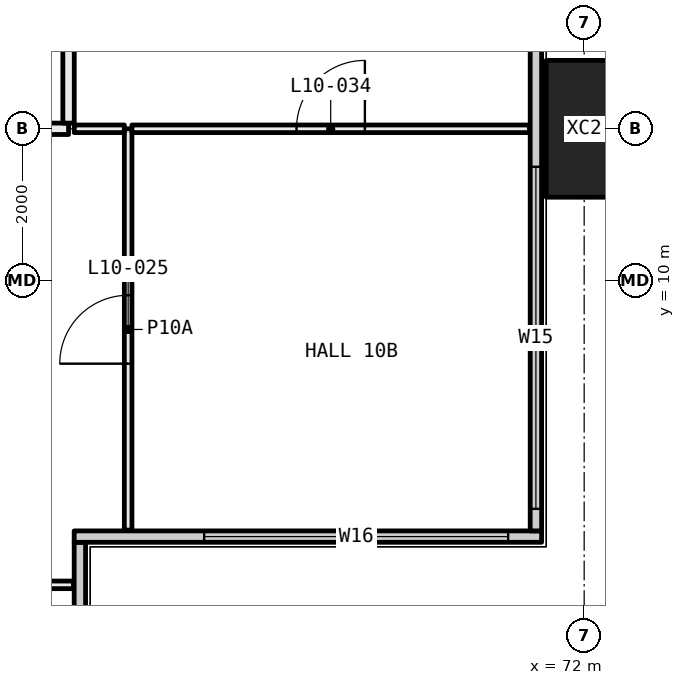
"""IFC4 building model, lengths in metres.
Left out: names, types, materials, properties, quantities, classifications, styles, units other than length and angle.
Written with IfcOpenShell. Run it as: python <this file> out.ifc"""

import sys

from ifc_helpers import new_model, si_unit, direction, frame, frame_2d, origin, origin_2d, place, context, subcontext, project, spatial, rectangle, hollow_rectangle, extrude, element, fill, save


model = new_model("IFC4")
c1 = context("Model", 3, precision=1e-05, world=origin(), true_north=direction((0.0, 1.0)))
c2 = subcontext(c1, "Body", "Model", "MODEL_VIEW")
j1 = project(units=[si_unit("LENGTHUNIT", "METRE"), si_unit("PLANEANGLEUNIT", "RADIAN")], contexts=[c1])
p1 = place(None, origin())
s1 = spatial("IfcSite", under=j1, at=p1, CompositionType="ELEMENT")
p2 = place(p1, origin())
s2 = spatial("IfcBuilding", under=s1, at=p2, CompositionType="ELEMENT")
p3 = place(p2, frame((0.0, 0.0, 47.25)))
s3 = spatial("IfcBuildingStorey", under=s2, at=p3, CompositionType="ELEMENT", Elevation=47.25)
p4 = place(p3, frame((72.0, 12.0, -0.4), z_axis=(0.0, 0.0, 1.0), x_axis=(0.0, 1.0, 0.0)))
e1 = element("IfcColumn", 1, at=p4, inside=s3, PredefinedType="COLUMN", context=c2, shape_type="SweptSolid", body=[
    extrude(hollow_rectangle(XDim=1.8, YDim=1.0, WallThickness=0.07, at=origin_2d()), origin(), (0.0, 0.0, 1.0), 3.45),
])
p5 = place(p3, frame((65.365, 0.71, 0.0), z_axis=(0.0, 0.0, 1.0), x_axis=(0.0, 1.0, 0.0)))
e2 = element("IfcWall", 2, at=p5, inside=s3, PredefinedType="ELEMENTEDWALL", context=c2, shape_type="SweptSolid", body=[
    extrude(rectangle(XDim=5.85, YDim=0.15, at=frame_2d((2.925, 0.0))), origin(), (0.0, 0.0, 1.0), 3.05),
])
p6 = place(p5, frame((0.29, 0.0, 0.45)))
e3 = element("IfcOpeningElement", 3, at=p6, cuts=e2, PredefinedType="OPENING", context=c2, shape_type="SweptSolid", body=[
    extrude(rectangle(XDim=4.0, YDim=2.55, at=frame_2d((2.0, 1.275))), frame((0.0, 0.085, 0.0), z_axis=(0.0, -1.0, 0.0), x_axis=(1.0, 0.0, 0.0)), (0.0, 0.0, 1.0), 0.17),
])
p7 = place(p3, frame((65.29, 6.635, 0.0), z_axis=(0.0, 0.0, 1.0), x_axis=(1.0, 0.0, 0.0)))
e4 = element("IfcWall", 4, at=p7, inside=s3, PredefinedType="ELEMENTEDWALL", context=c2, shape_type="SweptSolid", body=[
    extrude(rectangle(XDim=6.15, YDim=0.15, at=frame_2d((3.075, 0.0))), origin(), (0.0, 0.0, 1.0), 3.05),
])
p8 = place(p7, frame((1.71, 0.0, 0.45)))
e5 = element("IfcOpeningElement", 5, at=p8, cuts=e4, PredefinedType="OPENING", context=c2, shape_type="SweptSolid", body=[
    extrude(rectangle(XDim=4.0, YDim=2.55, at=frame_2d((2.0, 1.275))), frame((0.0, 0.085, 0.0), z_axis=(0.0, -1.0, 0.0), x_axis=(1.0, 0.0, 0.0)), (0.0, 0.0, 1.0), 0.17),
])
p9 = place(p3, frame((71.365, 6.71, 0.0), z_axis=(0.0, 0.0, 1.0), x_axis=(0.0, 1.0, 0.0)))
e6 = element("IfcWall", 6, at=p9, inside=s3, PredefinedType="ELEMENTEDWALL", context=c2, shape_type="SweptSolid", body=[
    extrude(rectangle(XDim=34.58, YDim=0.15, at=frame_2d((17.29, 0.0))), origin(), (0.0, 0.0, 1.0), 3.05),
])
p10 = place(p9, frame((0.29, 0.0, 0.45)))
e7 = element("IfcOpeningElement", 7, at=p10, cuts=e6, PredefinedType="OPENING", context=c2, shape_type="SweptSolid", body=[
    extrude(rectangle(XDim=4.5, YDim=2.55, at=frame_2d((2.25, 1.275))), frame((0.0, 0.085, 0.0), z_axis=(0.0, -1.0, 0.0), x_axis=(1.0, 0.0, 0.0)), (0.0, 0.0, 1.0), 0.17),
])
p11 = place(p9, frame((7.79, 0.0, 0.45)))
e8 = element("IfcOpeningElement", 8, at=p11, cuts=e6, PredefinedType="OPENING", context=c2, shape_type="SweptSolid", body=[
    extrude(rectangle(XDim=3.0, YDim=2.55, at=frame_2d((1.5, 1.275))), frame((0.0, 0.085, 0.0), z_axis=(0.0, -1.0, 0.0), x_axis=(1.0, 0.0, 0.0)), (0.0, 0.0, 1.0), 0.17),
])
p12 = place(p9, frame((11.79, 0.0, 0.45)))
e9 = element("IfcOpeningElement", 9, at=p12, cuts=e6, PredefinedType="OPENING", context=c2, shape_type="SweptSolid", body=[
    extrude(rectangle(XDim=3.0, YDim=2.55, at=frame_2d((1.5, 1.275))), frame((0.0, 0.085, 0.0), z_axis=(0.0, -1.0, 0.0), x_axis=(1.0, 0.0, 0.0)), (0.0, 0.0, 1.0), 0.17),
])
p13 = place(p9, frame((19.79, 0.0, 0.45)))
e10 = element("IfcOpeningElement", 10, at=p13, cuts=e6, PredefinedType="OPENING", context=c2, shape_type="SweptSolid", body=[
    extrude(rectangle(XDim=3.0, YDim=2.55, at=frame_2d((1.5, 1.275))), frame((0.0, 0.085, 0.0), z_axis=(0.0, -1.0, 0.0), x_axis=(1.0, 0.0, 0.0)), (0.0, 0.0, 1.0), 0.17),
])
p14 = place(p9, frame((23.79, 0.0, 0.45)))
e11 = element("IfcOpeningElement", 11, at=p14, cuts=e6, PredefinedType="OPENING", context=c2, shape_type="SweptSolid", body=[
    extrude(rectangle(XDim=2.0, YDim=2.55, at=frame_2d((1.0, 1.275))), frame((0.0, 0.085, 0.0), z_axis=(0.0, -1.0, 0.0), x_axis=(1.0, 0.0, 0.0)), (0.0, 0.0, 1.0), 0.17),
])
p15 = place(p9, frame((29.79, 0.0, 0.45)))
e12 = element("IfcOpeningElement", 12, at=p15, cuts=e6, PredefinedType="OPENING", context=c2, shape_type="SweptSolid", body=[
    extrude(rectangle(XDim=4.5, YDim=2.55, at=frame_2d((2.25, 1.275))), frame((0.0, 0.085, 0.0), z_axis=(0.0, -1.0, 0.0), x_axis=(1.0, 0.0, 0.0)), (0.0, 0.0, 1.0), 0.17),
])
p16 = place(p3, frame((65.28, 6.0, 0.0), z_axis=(0.0, 0.0, 1.0), x_axis=(-1.0, 0.0, 0.0)))
e13 = element("IfcWall", 13, at=p16, inside=s3, PredefinedType="PARTITIONING", context=c2, shape_type="SweptSolid", body=[
    extrude(rectangle(XDim=5.23, YDim=0.1, at=frame_2d((2.615, 0.0))), origin(), (0.0, 0.0, 1.0), 2.45),
])
p17 = place(p16, frame((2.165, 0.0, 0.0)))
e14 = element("IfcOpeningElement", 14, at=p17, cuts=e13, PredefinedType="OPENING", context=c2, shape_type="SweptSolid", body=[
    extrude(rectangle(XDim=0.9, YDim=2.1, at=frame_2d((0.45, 1.05))), frame((0.0, 0.06, 0.0), z_axis=(0.0, -1.0, 0.0), x_axis=(1.0, 0.0, 0.0)), (0.0, 0.0, 1.0), 0.12),
])
p18 = place(p3, frame((66.0, 6.72, 0.0), z_axis=(0.0, 0.0, 1.0), x_axis=(0.0, 1.0, 0.0)))
e15 = element("IfcWall", 15, at=p18, inside=s3, PredefinedType="PARTITIONING", context=c2, shape_type="SweptSolid", body=[
    extrude(rectangle(XDim=5.28, YDim=0.1, at=frame_2d((2.64, 0.0))), origin(), (0.0, 0.0, 1.0), 2.45),
])
p19 = place(p18, frame((2.19, 0.0, 0.0)))
e16 = element("IfcOpeningElement", 16, at=p19, cuts=e15, PredefinedType="OPENING", context=c2, shape_type="SweptSolid", body=[
    extrude(rectangle(XDim=0.9, YDim=2.1, at=frame_2d((0.45, 1.05))), frame((0.0, 0.06, 0.0), z_axis=(0.0, -1.0, 0.0), x_axis=(1.0, 0.0, 0.0)), (0.0, 0.0, 1.0), 0.12),
])
p20 = place(p3, frame((65.95, 12.0, 0.0), z_axis=(0.0, 0.0, 1.0), x_axis=(-1.0, 0.0, 0.0)))
e17 = element("IfcWall", 17, at=p20, inside=s3, PredefinedType="PARTITIONING", context=c2, shape_type="SweptSolid", body=[
    extrude(rectangle(XDim=0.659, YDim=0.1, at=frame_2d((0.33, 0.0))), origin(), (0.0, 0.0, 1.0), 2.45),
])
p21 = place(p3, frame((65.216, 12.0, 0.0), z_axis=(0.0, 0.0, 1.0), x_axis=(-1.0, 0.0, 0.0)))
e18 = element("IfcWall", 18, at=p21, inside=s3, PredefinedType="PARTITIONING", context=c2, shape_type="SweptSolid", body=[
    extrude(rectangle(XDim=3.716, YDim=0.15, at=frame_2d((1.858, 0.0))), origin(), (0.0, 0.0, 1.0), 2.45),
])
p22 = place(p21, frame((1.408, 0.0, 0.0)))
e19 = element("IfcOpeningElement", 19, at=p22, cuts=e18, PredefinedType="OPENING", context=c2, shape_type="SweptSolid", body=[
    extrude(rectangle(XDim=0.9, YDim=2.1, at=frame_2d((0.45, 1.05))), frame((0.0, 0.085, 0.0), z_axis=(0.0, -1.0, 0.0), x_axis=(1.0, 0.0, 0.0)), (0.0, 0.0, 1.0), 0.17),
])
p23 = place(p3, frame((71.28, 12.0, 0.0), z_axis=(0.0, 0.0, 1.0), x_axis=(-1.0, 0.0, 0.0)))
e20 = element("IfcWall", 20, at=p23, inside=s3, PredefinedType="PARTITIONING", context=c2, shape_type="SweptSolid", body=[
    extrude(rectangle(XDim=5.23, YDim=0.1, at=frame_2d((2.615, 0.0))), origin(), (0.0, 0.0, 1.0), 2.45),
])
p24 = place(p23, frame((2.165, 0.0, 0.0)))
e21 = element("IfcOpeningElement", 21, at=p24, cuts=e20, PredefinedType="OPENING", context=c2, shape_type="SweptSolid", body=[
    extrude(rectangle(XDim=0.9, YDim=2.1, at=frame_2d((0.45, 1.05))), frame((0.0, 0.06, 0.0), z_axis=(0.0, -1.0, 0.0), x_axis=(1.0, 0.0, 0.0)), (0.0, 0.0, 1.0), 0.12),
])
p25 = place(p3, frame((65.216, 15.229, 0.0), z_axis=(0.0, 0.0, 1.0), x_axis=(0.0, -1.0, 0.0)))
e22 = element("IfcWall", 22, at=p25, inside=s3, PredefinedType="PARTITIONING", context=c2, shape_type="SweptSolid", body=[
    extrude(rectangle(XDim=3.154, YDim=0.15, at=frame_2d((1.577, 0.0))), origin(), (0.0, 0.0, 1.0), 2.45),
])
p26 = place(p8, origin())
e23 = element("IfcWindow", 23, at=p26, inside=s3, PartitioningType="SINGLE_PANEL", PredefinedType="WINDOW", context=c2, shape_type="SweptSolid", body=[
    extrude(rectangle(XDim=4.0, YDim=2.55, at=frame_2d((2.0, 1.275))), frame((0.0, 0.03, 0.0), z_axis=(0.0, -1.0, 0.0), x_axis=(1.0, 0.0, 0.0)), (0.0, 0.0, 1.0), 0.06),
])
fill(e5, e23)
p27 = place(p10, origin())
e24 = element("IfcWindow", 24, at=p27, inside=s3, PartitioningType="SINGLE_PANEL", PredefinedType="WINDOW", context=c2, shape_type="SweptSolid", body=[
    extrude(rectangle(XDim=4.5, YDim=2.55, at=frame_2d((2.25, 1.275))), frame((0.0, 0.03, 0.0), z_axis=(0.0, -1.0, 0.0), x_axis=(1.0, 0.0, 0.0)), (0.0, 0.0, 1.0), 0.06),
])
fill(e7, e24)
p28 = place(p19, origin())
e25 = element("IfcDoor", 25, at=p28, inside=s3, OperationType="SINGLE_SWING_RIGHT", PredefinedType="DOOR", context=c2, shape_type="SweptSolid", body=[
    extrude(rectangle(XDim=0.9, YDim=2.1, at=frame_2d((0.45, 1.05))), frame((0.0, 0.025, 0.0), z_axis=(0.0, -1.0, 0.0), x_axis=(1.0, 0.0, 0.0)), (0.0, 0.0, 1.0), 0.05),
])
fill(e16, e25)
p29 = place(p24, frame((0.9, 0.0, 0.0), x_axis=(-1.0, 0.0, 0.0)))
e26 = element("IfcDoor", 26, at=p29, inside=s3, OperationType="SINGLE_SWING_LEFT", PredefinedType="DOOR", context=c2, shape_type="SweptSolid", body=[
    extrude(rectangle(XDim=0.9, YDim=2.1, at=frame_2d((0.45, 1.05))), frame((0.0, 0.025, 0.0), z_axis=(0.0, -1.0, 0.0), x_axis=(1.0, 0.0, 0.0)), (0.0, 0.0, 1.0), 0.05),
])
fill(e21, e26)
save(model, sys.argv[1])
